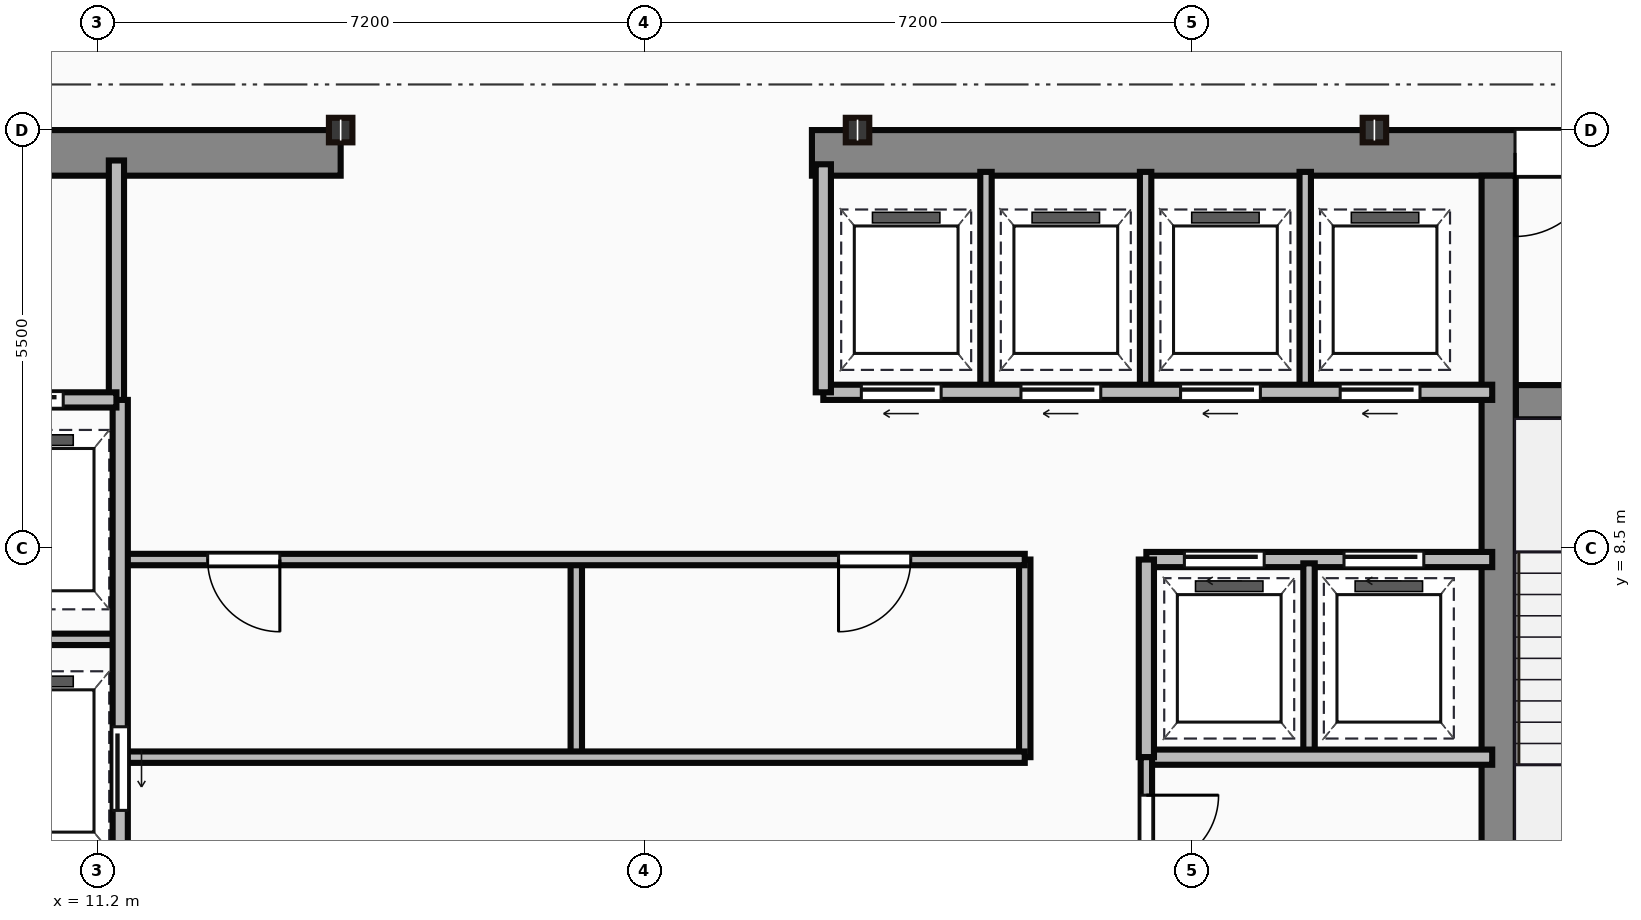
"""IFC4 building model, lengths in metres.
Left out: names, types, materials, properties, quantities, classifications, styles, units other than length and angle.
Written with IfcOpenShell. Run it as: python <this file> out.ifc"""

import sys

from ifc_helpers import new_model, si_unit, direction, frame, frame_2d, origin, origin_2d, place, context, subcontext, project, spatial, rectangle, i_section, extrude, source, transform, mapped, element, fill, save


model = new_model("IFC4")
c1 = context("Model", 3, precision=1e-05, world=origin(), true_north=direction((0.0, 1.0)))
c2 = subcontext(c1, "Body", "Model", "MODEL_VIEW")
j1 = project(units=[si_unit("LENGTHUNIT", "METRE"), si_unit("PLANEANGLEUNIT", "RADIAN")], contexts=[c1])
p1 = place(None, origin())
s1 = spatial("IfcSite", under=j1, at=p1, CompositionType="ELEMENT")
p2 = place(p1, origin())
s2 = spatial("IfcBuilding", under=s1, at=p2, CompositionType="ELEMENT")
p3 = place(p2, frame((0.0, 0.0, 251.5)))
s3 = spatial("IfcBuildingStorey", under=s2, at=p3, CompositionType="ELEMENT", Elevation=251.5)
m1 = source(origin(), c2, "Body", "SweptSolid", [
    extrude(rectangle(XDim=9.1, YDim=0.6, at=frame_2d((4.55, 0.0))), origin(), (0.0, 0.0, 1.0), 3.65),
])
p4 = place(p3, frame((5.3, 13.7, 0.0), z_axis=(0.0, 0.0, 1.0), x_axis=(1.0, 0.0, 0.0)))
e1 = element("IfcWall", 1, at=p4, inside=s3, PredefinedType="SHEAR", context=c2, shape_type="MappedRepresentation", body=[
    mapped(m1, transform((0.0, 0.0, 0.0))),
])
p5 = place(p4, frame((4.1, 0.0, 0.0)))
e2 = element("IfcOpeningElement", 2, at=p5, cuts=e1, PredefinedType="OPENING", context=c2, shape_type="SweptSolid", body=[
    extrude(rectangle(XDim=1.1, YDim=2.15, at=frame_2d((0.55, 1.075))), frame((0.0, 0.31, 0.0), z_axis=(0.0, -1.0, 0.0), x_axis=(1.0, 0.0, 0.0)), (0.0, 0.0, 1.0), 0.62),
])
m2 = source(origin(), c2, "Body", "SweptSolid", [
    extrude(rectangle(XDim=12.6, YDim=0.6, at=frame_2d((6.3, 0.0))), origin(), (0.0, 0.0, 1.0), 3.65),
])
p6 = place(p3, frame((20.6, 13.7, 0.0), z_axis=(0.0, 0.0, 1.0), x_axis=(1.0, 0.0, 0.0)))
e3 = element("IfcWall", 3, at=p6, inside=s3, PredefinedType="SHEAR", context=c2, shape_type="MappedRepresentation", body=[
    mapped(m2, transform((0.0, 0.0, 0.0))),
])
p7 = place(p6, frame((9.25, 0.0, 0.0)))
e4 = element("IfcOpeningElement", 4, at=p7, cuts=e3, PredefinedType="OPENING", context=c2, shape_type="SweptSolid", body=[
    extrude(rectangle(XDim=1.1, YDim=2.15, at=frame_2d((0.55, 1.075))), frame((0.0, 0.31, 0.0), z_axis=(0.0, -1.0, 0.0), x_axis=(1.0, 0.0, 0.0)), (0.0, 0.0, 1.0), 0.62),
])
m3 = source(origin(), c2, "Body", "SweptSolid", [
    extrude(rectangle(XDim=12.5, YDim=0.45, at=frame_2d((6.25, 0.0))), origin(), (0.0, 0.0, 1.0), 3.65),
])
p8 = place(p3, frame((29.635, 0.9, 0.0), z_axis=(0.0, 0.0, 1.0), x_axis=(0.0, 1.0, 0.0)))
e5 = element("IfcWall", 5, at=p8, inside=s3, PredefinedType="SHEAR", context=c2, shape_type="MappedRepresentation", body=[
    mapped(m3, transform((0.0, 0.0, 0.0))),
])
m4 = source(origin(), c2, "Body", "SweptSolid", [
    extrude(rectangle(XDim=3.39, YDim=0.45, at=frame_2d((1.695, 0.0))), origin(), (0.0, 0.0, 1.0), 3.65),
])
p9 = place(p3, frame((29.86, 10.42, 0.0), z_axis=(0.0, 0.0, 1.0), x_axis=(1.0, 0.0, 0.0)))
e6 = element("IfcWall", 6, at=p9, inside=s3, PredefinedType="SHEAR", context=c2, shape_type="MappedRepresentation", body=[
    mapped(m4, transform((0.0, 0.0, 0.0))),
])
p10 = place(p9, frame((1.1, 0.0, 0.0)))
e7 = element("IfcOpeningElement", 7, at=p10, cuts=e6, PredefinedType="OPENING", context=c2, shape_type="SweptSolid", body=[
    extrude(rectangle(XDim=1.1, YDim=2.15, at=frame_2d((0.55, 1.075))), frame((0.0, 0.235, 0.0), z_axis=(0.0, -1.0, 0.0), x_axis=(1.0, 0.0, 0.0)), (0.0, 0.0, 1.0), 0.47),
])
m5 = source(origin(), c2, "Body", "SweptSolid", [
    extrude(i_section(OverallWidth=0.309, OverallDepth=0.323, WebThickness=0.014, FlangeThickness=0.023, at=origin_2d()), origin(), (0.0, 0.0, 1.0), 3.65),
])
for number, where, z_axis, x_axis in (
    (8, (14.4, 14.0, 0.0), (0.0, 0.0, 1.0), (1.0, 0.0, 0.0)),
    (9, (21.2, 14.0, 0.0), (0.0, 0.0, 1.0), (1.0, 0.0, 0.0)),
    (10, (28.0, 14.0, 0.0), (0.0, 0.0, 1.0), (1.0, 0.0, 0.0)),
):
    element("IfcColumn", number, at=place(p3, frame(where, z_axis=z_axis, x_axis=x_axis)), inside=s3, PredefinedType="COLUMN", context=c2, shape_type="MappedRepresentation", body=[
        mapped(m5, transform((0.0, 0.0, 0.0))),
    ])
m6 = source(origin(), c2, "Body", "SweptSolid", [
    extrude(rectangle(XDim=3.18, YDim=0.2, at=frame_2d((1.59, 0.0))), origin(), (0.0, 0.0, 1.0), 3.4),
])
p11 = place(p3, frame((11.45, 10.42, 0.0), z_axis=(0.0, 0.0, 1.0), x_axis=(0.0, 1.0, 0.0)))
e11 = element("IfcWall", 11, at=p11, inside=s3, PredefinedType="PARTITIONING", context=c2, shape_type="MappedRepresentation", body=[
    mapped(m6, transform((0.0, 0.0, 0.0))),
])
m7 = source(origin(), c2, "Body", "SweptSolid", [
    extrude(rectangle(XDim=2.35, YDim=0.2, at=frame_2d((1.175, 0.0))), origin(), (0.0, 0.0, 1.0), 3.4),
])
p12 = place(p3, frame((9.1, 10.45, 0.0), z_axis=(0.0, 0.0, 1.0), x_axis=(1.0, 0.0, 0.0)))
e12 = element("IfcWall", 12, at=p12, inside=s3, PredefinedType="PARTITIONING", context=c2, shape_type="MappedRepresentation", body=[
    mapped(m7, transform((0.0, 0.0, 0.0))),
])
p13 = place(p12, frame((0.55, 0.0, 0.0)))
e13 = element("IfcOpeningElement", 13, at=p13, cuts=e12, PredefinedType="OPENING", context=c2, shape_type="SweptSolid", body=[
    extrude(rectangle(XDim=1.1, YDim=2.15, at=frame_2d((0.55, 1.075))), frame((0.0, 0.11, 0.0), z_axis=(0.0, -1.0, 0.0), x_axis=(1.0, 0.0, 0.0)), (0.0, 0.0, 1.0), 0.22),
])
m8 = source(origin(), c2, "Body", "SweptSolid", [
    extrude(rectangle(XDim=9.6, YDim=0.2, at=frame_2d((4.8, 0.0))), origin(), (0.0, 0.0, 1.0), 3.4),
])
p14 = place(p3, frame((11.5, 0.85, 0.0), z_axis=(0.0, 0.0, 1.0), x_axis=(0.0, 1.0, 0.0)))
e14 = element("IfcWall", 14, at=p14, inside=s3, PredefinedType="PARTITIONING", context=c2, shape_type="MappedRepresentation", body=[
    mapped(m8, transform((0.0, 0.0, 0.0))),
])
p15 = place(p14, frame((4.2, 0.0, 0.0)))
e15 = element("IfcOpeningElement", 15, at=p15, cuts=e14, PredefinedType="OPENING", context=c2, shape_type="SweptSolid", body=[
    extrude(rectangle(XDim=1.1, YDim=2.15, at=frame_2d((0.55, 1.075))), frame((0.0, 0.11, 0.0), z_axis=(0.0, -1.0, 0.0), x_axis=(1.0, 0.0, 0.0)), (0.0, 0.0, 1.0), 0.22),
])
p16 = place(p14, frame((0.9, 0.0, 0.0)))
e16 = element("IfcOpeningElement", 16, at=p16, cuts=e14, PredefinedType="OPENING", context=c2, shape_type="SweptSolid", body=[
    extrude(rectangle(XDim=1.2, YDim=2.15, at=frame_2d((0.6, 1.075))), frame((0.0, 0.11, 0.0), z_axis=(0.0, -1.0, 0.0), x_axis=(1.0, 0.0, 0.0)), (0.0, 0.0, 1.0), 0.22),
])
m9 = source(origin(), c2, "Body", "SweptSolid", [
    extrude(rectangle(XDim=2.4, YDim=0.15, at=frame_2d((1.2, 0.0))), origin(), (0.0, 0.0, 1.0), 3.4),
])
p17 = place(p3, frame((9.1, 7.3, 0.0), z_axis=(0.0, 0.0, 1.0), x_axis=(1.0, 0.0, 0.0)))
e17 = element("IfcWall", 17, at=p17, inside=s3, PredefinedType="PARTITIONING", context=c2, shape_type="MappedRepresentation", body=[
    mapped(m9, transform((0.0, 0.0, 0.0))),
])
m10 = source(origin(), c2, "Body", "SweptSolid", [
    extrude(rectangle(XDim=11.85, YDim=0.15, at=frame_2d((5.925, 0.0))), origin(), (0.0, 0.0, 1.0), 3.4),
])
p18 = place(p3, frame((11.55, 5.75, 0.0), z_axis=(0.0, 0.0, 1.0), x_axis=(1.0, 0.0, 0.0)))
e18 = element("IfcWall", 18, at=p18, inside=s3, PredefinedType="PARTITIONING", context=c2, shape_type="MappedRepresentation", body=[
    mapped(m10, transform((0.0, 0.0, 0.0))),
])
p19 = place(p3, frame((11.55, 8.35, 0.0), z_axis=(0.0, 0.0, 1.0), x_axis=(1.0, 0.0, 0.0)))
e19 = element("IfcWall", 19, at=p19, inside=s3, PredefinedType="PARTITIONING", context=c2, shape_type="MappedRepresentation", body=[
    mapped(m10, transform((0.0, 0.0, 0.0))),
])
p20 = place(p19, frame((1.1, 0.0, 0.0)))
e20 = element("IfcOpeningElement", 20, at=p20, cuts=e19, PredefinedType="OPENING", context=c2, shape_type="SweptSolid", body=[
    extrude(rectangle(XDim=0.95, YDim=2.15, at=frame_2d((0.475, 1.075))), frame((0.0, 0.085, 0.0), z_axis=(0.0, -1.0, 0.0), x_axis=(1.0, 0.0, 0.0)), (0.0, 0.0, 1.0), 0.17),
])
p21 = place(p19, frame((9.4, 0.0, 0.0)))
e21 = element("IfcOpeningElement", 21, at=p21, cuts=e19, PredefinedType="OPENING", context=c2, shape_type="SweptSolid", body=[
    extrude(rectangle(XDim=0.95, YDim=2.15, at=frame_2d((0.475, 1.075))), frame((0.0, 0.085, 0.0), z_axis=(0.0, -1.0, 0.0), x_axis=(1.0, 0.0, 0.0)), (0.0, 0.0, 1.0), 0.17),
])
m11 = source(origin(), c2, "Body", "SweptSolid", [
    extrude(rectangle(XDim=2.6, YDim=0.15, at=frame_2d((1.3, 0.0))), origin(), (0.0, 0.0, 1.0), 3.4),
])
p22 = place(p3, frame((23.4, 5.75, 0.0), z_axis=(0.0, 0.0, 1.0), x_axis=(0.0, 1.0, 0.0)))
e22 = element("IfcWall", 22, at=p22, inside=s3, PredefinedType="PARTITIONING", context=c2, shape_type="MappedRepresentation", body=[
    mapped(m11, transform((0.0, 0.0, 0.0))),
])
m12 = source(origin(), c2, "Body", "SweptSolid", [
    extrude(rectangle(XDim=2.5, YDim=0.15, at=frame_2d((1.25, 0.0))), origin(), (0.0, 0.0, 1.0), 3.4),
])
p23 = place(p3, frame((17.5, 5.8, 0.0), z_axis=(0.0, 0.0, 1.0), x_axis=(0.0, 1.0, 0.0)))
e23 = element("IfcWall", 23, at=p23, inside=s3, PredefinedType="PARTITIONING", context=c2, shape_type="MappedRepresentation", body=[
    mapped(m12, transform((0.0, 0.0, 0.0))),
])
m13 = source(origin(), c2, "Body", "SweptSolid", [
    extrude(rectangle(XDim=8.8, YDim=0.2, at=frame_2d((4.4, 0.0))), origin(), (0.0, 0.0, 1.0), 3.4),
])
p24 = place(p3, frame((20.75, 10.55, 0.0), z_axis=(0.0, 0.0, 1.0), x_axis=(1.0, 0.0, 0.0)))
e24 = element("IfcWall", 24, at=p24, inside=s3, PredefinedType="PARTITIONING", context=c2, shape_type="MappedRepresentation", body=[
    mapped(m13, transform((0.0, 0.0, 0.0))),
])
p25 = place(p24, frame((0.5, 0.0, 0.0)))
e25 = element("IfcOpeningElement", 25, at=p25, cuts=e24, PredefinedType="OPENING", context=c2, shape_type="SweptSolid", body=[
    extrude(rectangle(XDim=1.05, YDim=2.15, at=frame_2d((0.525, 1.075))), frame((0.0, 0.11, 0.0), z_axis=(0.0, -1.0, 0.0), x_axis=(1.0, 0.0, 0.0)), (0.0, 0.0, 1.0), 0.22),
])
p26 = place(p24, frame((2.6, 0.0, 0.0)))
e26 = element("IfcOpeningElement", 26, at=p26, cuts=e24, PredefinedType="OPENING", context=c2, shape_type="SweptSolid", body=[
    extrude(rectangle(XDim=1.05, YDim=2.15, at=frame_2d((0.525, 1.075))), frame((0.0, 0.11, 0.0), z_axis=(0.0, -1.0, 0.0), x_axis=(1.0, 0.0, 0.0)), (0.0, 0.0, 1.0), 0.22),
])
p27 = place(p24, frame((4.7, 0.0, 0.0)))
e27 = element("IfcOpeningElement", 27, at=p27, cuts=e24, PredefinedType="OPENING", context=c2, shape_type="SweptSolid", body=[
    extrude(rectangle(XDim=1.05, YDim=2.15, at=frame_2d((0.525, 1.075))), frame((0.0, 0.11, 0.0), z_axis=(0.0, -1.0, 0.0), x_axis=(1.0, 0.0, 0.0)), (0.0, 0.0, 1.0), 0.22),
])
p28 = place(p24, frame((6.8, 0.0, 0.0)))
e28 = element("IfcOpeningElement", 28, at=p28, cuts=e24, PredefinedType="OPENING", context=c2, shape_type="SweptSolid", body=[
    extrude(rectangle(XDim=1.05, YDim=2.15, at=frame_2d((0.525, 1.075))), frame((0.0, 0.11, 0.0), z_axis=(0.0, -1.0, 0.0), x_axis=(1.0, 0.0, 0.0)), (0.0, 0.0, 1.0), 0.22),
])
m14 = source(origin(), c2, "Body", "SweptSolid", [
    extrude(rectangle(XDim=3.0, YDim=0.2, at=frame_2d((1.5, 0.0))), origin(), (0.0, 0.0, 1.0), 3.4),
])
p29 = place(p3, frame((20.75, 10.55, 0.0), z_axis=(0.0, 0.0, 1.0), x_axis=(0.0, 1.0, 0.0)))
e29 = element("IfcWall", 29, at=p29, inside=s3, PredefinedType="PARTITIONING", context=c2, shape_type="MappedRepresentation", body=[
    mapped(m14, transform((0.0, 0.0, 0.0))),
])
m15 = source(origin(), c2, "Body", "SweptSolid", [
    extrude(rectangle(XDim=2.85, YDim=0.15, at=frame_2d((1.425, 0.0))), origin(), (0.0, 0.0, 1.0), 3.4),
])
for number, where, z_axis, x_axis in (
    (30, (22.89, 10.6, 0.0), (0.0, 0.0, 1.0), (0.0, 1.0, 0.0)),
    (31, (24.99, 10.6, 0.0), (0.0, 0.0, 1.0), (0.0, 1.0, 0.0)),
    (32, (27.09, 10.6, 0.0), (0.0, 0.0, 1.0), (0.0, 1.0, 0.0)),
):
    element("IfcWall", number, at=place(p3, frame(where, z_axis=z_axis, x_axis=x_axis)), inside=s3, PredefinedType="PARTITIONING", context=c2, shape_type="MappedRepresentation", body=[
        mapped(m15, transform((0.0, 0.0, 0.0))),
    ])
m16 = source(origin(), c2, "Body", "SweptSolid", [
    extrude(rectangle(XDim=4.55, YDim=0.2, at=frame_2d((2.275, 0.0))), origin(), (0.0, 0.0, 1.0), 3.4),
])
p30 = place(p3, frame((25.0, 8.35, 0.0), z_axis=(0.0, 0.0, 1.0), x_axis=(1.0, 0.0, 0.0)))
e33 = element("IfcWall", 33, at=p30, inside=s3, PredefinedType="PARTITIONING", context=c2, shape_type="MappedRepresentation", body=[
    mapped(m16, transform((0.0, 0.0, 0.0))),
])
p31 = place(p30, frame((0.5, 0.0, 0.0)))
e34 = element("IfcOpeningElement", 34, at=p31, cuts=e33, PredefinedType="OPENING", context=c2, shape_type="SweptSolid", body=[
    extrude(rectangle(XDim=1.05, YDim=2.15, at=frame_2d((0.525, 1.075))), frame((0.0, 0.11, 0.0), z_axis=(0.0, -1.0, 0.0), x_axis=(1.0, 0.0, 0.0)), (0.0, 0.0, 1.0), 0.22),
])
p32 = place(p30, frame((2.6, 0.0, 0.0)))
e35 = element("IfcOpeningElement", 35, at=p32, cuts=e33, PredefinedType="OPENING", context=c2, shape_type="SweptSolid", body=[
    extrude(rectangle(XDim=1.05, YDim=2.15, at=frame_2d((0.525, 1.075))), frame((0.0, 0.11, 0.0), z_axis=(0.0, -1.0, 0.0), x_axis=(1.0, 0.0, 0.0)), (0.0, 0.0, 1.0), 0.22),
])
p33 = place(p3, frame((25.0, 5.75, 0.0), z_axis=(0.0, 0.0, 1.0), x_axis=(1.0, 0.0, 0.0)))
e36 = element("IfcWall", 36, at=p33, inside=s3, PredefinedType="PARTITIONING", context=c2, shape_type="MappedRepresentation", body=[
    mapped(m16, transform((0.0, 0.0, 0.0))),
])
m17 = source(origin(), c2, "Body", "SweptSolid", [
    extrude(rectangle(XDim=2.6, YDim=0.2, at=frame_2d((1.3, 0.0))), origin(), (0.0, 0.0, 1.0), 3.4),
])
p34 = place(p3, frame((25.0, 5.75, 0.0), z_axis=(0.0, 0.0, 1.0), x_axis=(0.0, 1.0, 0.0)))
e37 = element("IfcWall", 37, at=p34, inside=s3, PredefinedType="PARTITIONING", context=c2, shape_type="MappedRepresentation", body=[
    mapped(m17, transform((0.0, 0.0, 0.0))),
])
p35 = place(p3, frame((27.14, 5.8, 0.0), z_axis=(0.0, 0.0, 1.0), x_axis=(0.0, 1.0, 0.0)))
e38 = element("IfcWall", 38, at=p35, inside=s3, PredefinedType="PARTITIONING", context=c2, shape_type="MappedRepresentation", body=[
    mapped(m12, transform((0.0, 0.0, 0.0))),
])
m18 = source(origin(), c2, "Body", "SweptSolid", [
    extrude(rectangle(XDim=4.9, YDim=0.15, at=frame_2d((2.45, 0.0))), origin(), (0.0, 0.0, 1.0), 3.4),
])
p36 = place(p3, frame((25.0, 0.85, 0.0), z_axis=(0.0, 0.0, 1.0), x_axis=(0.0, 1.0, 0.0)))
e39 = element("IfcWall", 39, at=p36, inside=s3, PredefinedType="PARTITIONING", context=c2, shape_type="MappedRepresentation", body=[
    mapped(m18, transform((0.0, 0.0, 0.0))),
])
p37 = place(p36, frame((1.8, 0.0, 0.0)))
e40 = element("IfcOpeningElement", 40, at=p37, cuts=e39, PredefinedType="OPENING", context=c2, shape_type="SweptSolid", body=[
    extrude(rectangle(XDim=0.95, YDim=2.15, at=frame_2d((0.475, 1.075))), frame((0.0, 0.085, 0.0), z_axis=(0.0, -1.0, 0.0), x_axis=(1.0, 0.0, 0.0)), (0.0, 0.0, 1.0), 0.17),
])
p38 = place(p36, frame((3.45, 0.0, 0.0)))
e41 = element("IfcOpeningElement", 41, at=p38, cuts=e39, PredefinedType="OPENING", context=c2, shape_type="SweptSolid", body=[
    extrude(rectangle(XDim=0.95, YDim=2.15, at=frame_2d((0.475, 1.075))), frame((0.0, 0.085, 0.0), z_axis=(0.0, -1.0, 0.0), x_axis=(1.0, 0.0, 0.0)), (0.0, 0.0, 1.0), 0.17),
])
m19 = source(origin(), c2, "Body", "SweptSolid", [
    extrude(rectangle(XDim=1.1, YDim=2.15, at=frame_2d((0.55, 1.075))), frame((0.0, 0.025, 0.0), z_axis=(0.0, -1.0, 0.0), x_axis=(1.0, 0.0, 0.0)), (0.0, 0.0, 1.0), 0.05),
])
p39 = place(p7, origin())
e42 = element("IfcDoor", 42, at=p39, inside=s3, OperationType="SINGLE_SWING_LEFT", PredefinedType="DOOR", context=c2, shape_type="MappedRepresentation", body=[
    mapped(m19, transform((0.0, 0.0, 0.0))),
])
fill(e4, e42)
p40 = place(p13, origin())
e43 = element("IfcDoor", 43, at=p40, inside=s3, OperationType="SLIDING_TO_LEFT", PredefinedType="DOOR", context=c2, shape_type="MappedRepresentation", body=[
    mapped(m19, transform((0.0, 0.0, 0.0))),
])
fill(e13, e43)
p41 = place(p15, frame((1.1, 0.0, 0.0), z_axis=(0.0, 0.0, 1.0), x_axis=(-1.0, 0.0, 0.0)))
e44 = element("IfcDoor", 44, at=p41, inside=s3, OperationType="SLIDING_TO_LEFT", PredefinedType="DOOR", context=c2, shape_type="MappedRepresentation", body=[
    mapped(m19, transform((0.0, 0.0, 0.0))),
])
fill(e15, e44)
m20 = source(origin(), c2, "Body", "SweptSolid", [
    extrude(rectangle(XDim=0.95, YDim=2.15, at=frame_2d((0.475, 1.075))), frame((0.0, 0.025, 0.0), z_axis=(0.0, -1.0, 0.0), x_axis=(1.0, 0.0, 0.0)), (0.0, 0.0, 1.0), 0.05),
])
p42 = place(p20, origin())
e45 = element("IfcDoor", 45, at=p42, inside=s3, OperationType="SINGLE_SWING_RIGHT", PredefinedType="DOOR", context=c2, shape_type="MappedRepresentation", body=[
    mapped(m20, transform((0.0, 0.0, 0.0))),
])
fill(e20, e45)
p43 = place(p21, origin())
e46 = element("IfcDoor", 46, at=p43, inside=s3, OperationType="SINGLE_SWING_LEFT", PredefinedType="DOOR", context=c2, shape_type="MappedRepresentation", body=[
    mapped(m20, transform((0.0, 0.0, 0.0))),
])
fill(e21, e46)
m21 = source(origin(), c2, "Body", "SweptSolid", [
    extrude(rectangle(XDim=1.05, YDim=2.15, at=frame_2d((0.525, 1.075))), frame((0.0, 0.025, 0.0), z_axis=(0.0, -1.0, 0.0), x_axis=(1.0, 0.0, 0.0)), (0.0, 0.0, 1.0), 0.05),
])
p44 = place(p25, frame((1.05, 0.0, 0.0), z_axis=(0.0, 0.0, 1.0), x_axis=(-1.0, 0.0, 0.0)))
e47 = element("IfcDoor", 47, at=p44, inside=s3, OperationType="SLIDING_TO_LEFT", PredefinedType="DOOR", context=c2, shape_type="MappedRepresentation", body=[
    mapped(m21, transform((0.0, 0.0, 0.0))),
])
fill(e25, e47)
p45 = place(p26, frame((1.05, 0.0, 0.0), z_axis=(0.0, 0.0, 1.0), x_axis=(-1.0, 0.0, 0.0)))
e48 = element("IfcDoor", 48, at=p45, inside=s3, OperationType="SLIDING_TO_LEFT", PredefinedType="DOOR", context=c2, shape_type="MappedRepresentation", body=[
    mapped(m21, transform((0.0, 0.0, 0.0))),
])
fill(e26, e48)
p46 = place(p27, frame((1.05, 0.0, 0.0), z_axis=(0.0, 0.0, 1.0), x_axis=(-1.0, 0.0, 0.0)))
e49 = element("IfcDoor", 49, at=p46, inside=s3, OperationType="SLIDING_TO_LEFT", PredefinedType="DOOR", context=c2, shape_type="MappedRepresentation", body=[
    mapped(m21, transform((0.0, 0.0, 0.0))),
])
fill(e27, e49)
p47 = place(p28, frame((1.05, 0.0, 0.0), z_axis=(0.0, 0.0, 1.0), x_axis=(-1.0, 0.0, 0.0)))
e50 = element("IfcDoor", 50, at=p47, inside=s3, OperationType="SLIDING_TO_LEFT", PredefinedType="DOOR", context=c2, shape_type="MappedRepresentation", body=[
    mapped(m21, transform((0.0, 0.0, 0.0))),
])
fill(e28, e50)
p48 = place(p31, origin())
e51 = element("IfcDoor", 51, at=p48, inside=s3, OperationType="SLIDING_TO_LEFT", PredefinedType="DOOR", context=c2, shape_type="MappedRepresentation", body=[
    mapped(m21, transform((0.0, 0.0, 0.0))),
])
fill(e34, e51)
p49 = place(p32, origin())
e52 = element("IfcDoor", 52, at=p49, inside=s3, OperationType="SLIDING_TO_LEFT", PredefinedType="DOOR", context=c2, shape_type="MappedRepresentation", body=[
    mapped(m21, transform((0.0, 0.0, 0.0))),
])
fill(e35, e52)
p50 = place(p38, origin())
e53 = element("IfcDoor", 53, at=p50, inside=s3, OperationType="SINGLE_SWING_RIGHT", PredefinedType="DOOR", context=c2, shape_type="MappedRepresentation", body=[
    mapped(m20, transform((0.0, 0.0, 0.0))),
])
fill(e41, e53)
save(model, sys.argv[1])
